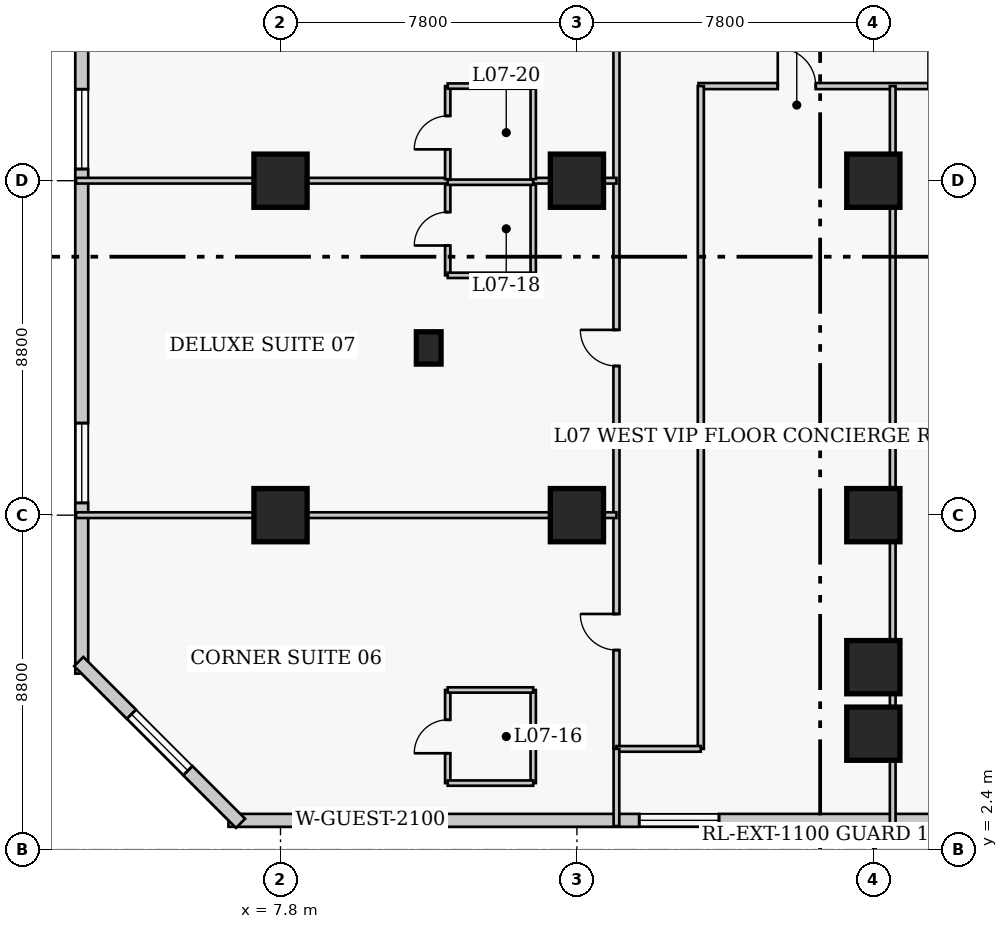
"""IFC4 building model, lengths in metres.
Left out: names, types, materials, properties, quantities, classifications, styles, units other than length and angle.
Written with IfcOpenShell. Run it as: python <this file> out.ifc"""

import sys

from ifc_helpers import new_model, si_unit, direction, frame, frame_2d, origin, origin_2d, place, context, subcontext, project, spatial, rectangle, extrude, element, fill, save


model = new_model("IFC4")
c1 = context("Model", 3, precision=1e-05, world=origin(), true_north=direction((0.0, 1.0)))
c2 = subcontext(c1, "Body", "Model", "MODEL_VIEW")
j1 = project(units=[si_unit("LENGTHUNIT", "METRE"), si_unit("PLANEANGLEUNIT", "RADIAN")], contexts=[c1])
p1 = place(None, origin())
s1 = spatial("IfcSite", under=j1, at=p1, CompositionType="ELEMENT")
p2 = place(p1, origin())
s2 = spatial("IfcBuilding", under=s1, at=p2, CompositionType="ELEMENT")
p3 = place(p2, frame((0.0, 0.0, 33.6)))
s3 = spatial("IfcBuildingStorey", under=s2, at=p3, CompositionType="ELEMENT", Elevation=33.6)
for number, where, z_axis, x_axis in (
    (1, (7.8, 11.2, 0.0), (0.0, 0.0, 1.0), (1.0, 0.0, 0.0)),
    (2, (7.8, 20.0, 0.0), (0.0, 0.0, 1.0), (1.0, 0.0, 0.0)),
    (3, (15.6, 11.2, 0.0), (0.0, 0.0, 1.0), (1.0, 0.0, 0.0)),
    (4, (15.6, 20.0, 0.0), (0.0, 0.0, 1.0), (1.0, 0.0, 0.0)),
    (5, (23.4, 11.2, 0.0), (0.0, 0.0, 1.0), (1.0, 0.0, 0.0)),
    (6, (23.4, 20.0, 0.0), (0.0, 0.0, 1.0), (1.0, 0.0, 0.0)),
    (7, (23.4, 7.2, 0.0), (0.0, 0.0, 1.0), (1.0, 0.0, 0.0)),
    (8, (23.4, 5.45, 0.0), (0.0, 0.0, 1.0), (1.0, 0.0, 0.0)),
):
    element("IfcColumn", number, at=place(p3, frame(where, z_axis=z_axis, x_axis=x_axis)), inside=s3, PredefinedType="COLUMN", context=c2, shape_type="SweptSolid", body=[
        extrude(rectangle(XDim=1.4, YDim=1.4, at=origin_2d()), origin(), (0.0, 0.0, 1.0), 3.8),
    ])
p4 = place(p3, frame((11.7, 15.6, 0.0), z_axis=(0.0, 0.0, 1.0), x_axis=(1.0, 0.0, 0.0)))
e9 = element("IfcColumn", 9, at=p4, inside=s3, PredefinedType="PILASTER", context=c2, shape_type="SweptSolid", body=[
    extrude(rectangle(XDim=0.65, YDim=0.85, at=origin_2d()), origin(), (0.0, 0.0, 1.0), 3.8),
])
p5 = place(p3, frame((6.43, 3.17, 0.0), z_axis=(0.0, 0.0, 1.0), x_axis=(1.0, 0.0, 0.0)))
e10 = element("IfcWall", 10, at=p5, inside=s3, PredefinedType="SOLIDWALL", context=c2, shape_type="SweptSolid", body=[
    extrude(rectangle(XDim=29.89, YDim=0.34, at=frame_2d((14.945, 0.0))), origin(), (0.0, 0.0, 1.0), 3.54),
])
p6 = place(p5, frame((20.17, 0.0, 0.0)))
e11 = element("IfcOpeningElement", 11, at=p6, cuts=e10, PredefinedType="OPENING", context=c2, shape_type="SweptSolid", body=[
    extrude(rectangle(XDim=1.4, YDim=2.15, at=frame_2d((0.7, 1.075))), frame((0.0, 0.18, 0.0), z_axis=(0.0, -1.0, 0.0), x_axis=(1.0, 0.0, 0.0)), (0.0, 0.0, 1.0), 0.36),
])
p7 = place(p5, frame((2.686, 0.0, 0.85)))
e12 = element("IfcOpeningElement", 12, at=p7, cuts=e10, PredefinedType="OPENING", context=c2, shape_type="SweptSolid", body=[
    extrude(rectangle(XDim=2.1, YDim=1.85, at=frame_2d((1.05, 0.925))), frame((0.0, 0.18, 0.0), z_axis=(0.0, -1.0, 0.0), x_axis=(1.0, 0.0, 0.0)), (0.0, 0.0, 1.0), 0.36),
])
p8 = place(p5, frame((10.809, 0.0, 0.85)))
e13 = element("IfcOpeningElement", 13, at=p8, cuts=e10, PredefinedType="OPENING", context=c2, shape_type="SweptSolid", body=[
    extrude(rectangle(XDim=2.1, YDim=1.85, at=frame_2d((1.05, 0.925))), frame((0.0, 0.18, 0.0), z_axis=(0.0, -1.0, 0.0), x_axis=(1.0, 0.0, 0.0)), (0.0, 0.0, 1.0), 0.36),
])
p9 = place(p5, frame((25.104, 0.0, 0.85)))
e14 = element("IfcOpeningElement", 14, at=p9, cuts=e10, PredefinedType="OPENING", context=c2, shape_type="SweptSolid", body=[
    extrude(rectangle(XDim=2.1, YDim=1.85, at=frame_2d((1.05, 0.925))), frame((0.0, 0.18, 0.0), z_axis=(0.0, -1.0, 0.0), x_axis=(1.0, 0.0, 0.0)), (0.0, 0.0, 1.0), 0.36),
])
p10 = place(p3, frame((2.57, 42.17, 0.0), z_axis=(0.0, 0.0, 1.0), x_axis=(0.0, -1.0, 0.0)))
e15 = element("IfcWall", 15, at=p10, inside=s3, PredefinedType="SOLIDWALL", context=c2, shape_type="SweptSolid", body=[
    extrude(rectangle(XDim=35.14, YDim=0.34, at=frame_2d((17.57, 0.0))), origin(), (0.0, 0.0, 1.0), 3.54),
])
p11 = place(p10, frame((3.343, 0.0, 0.85)))
e16 = element("IfcOpeningElement", 16, at=p11, cuts=e15, PredefinedType="OPENING", context=c2, shape_type="SweptSolid", body=[
    extrude(rectangle(XDim=2.1, YDim=1.85, at=frame_2d((1.05, 0.925))), frame((0.0, 0.18, 0.0), z_axis=(0.0, -1.0, 0.0), x_axis=(1.0, 0.0, 0.0)), (0.0, 0.0, 1.0), 0.36),
])
p12 = place(p10, frame((10.978, 0.0, 0.85)))
e17 = element("IfcOpeningElement", 17, at=p12, cuts=e15, PredefinedType="OPENING", context=c2, shape_type="SweptSolid", body=[
    extrude(rectangle(XDim=2.1, YDim=1.85, at=frame_2d((1.05, 0.925))), frame((0.0, 0.18, 0.0), z_axis=(0.0, -1.0, 0.0), x_axis=(1.0, 0.0, 0.0)), (0.0, 0.0, 1.0), 0.36),
])
p13 = place(p10, frame((19.762, 0.0, 0.85)))
e18 = element("IfcOpeningElement", 18, at=p13, cuts=e15, PredefinedType="OPENING", context=c2, shape_type="SweptSolid", body=[
    extrude(rectangle(XDim=2.1, YDim=1.85, at=frame_2d((1.05, 0.925))), frame((0.0, 0.18, 0.0), z_axis=(0.0, -1.0, 0.0), x_axis=(1.0, 0.0, 0.0)), (0.0, 0.0, 1.0), 0.36),
])
p14 = place(p10, frame((28.548, 0.0, 0.85)))
e19 = element("IfcOpeningElement", 19, at=p14, cuts=e15, PredefinedType="OPENING", context=c2, shape_type="SweptSolid", body=[
    extrude(rectangle(XDim=2.1, YDim=1.85, at=frame_2d((1.05, 0.925))), frame((0.0, 0.18, 0.0), z_axis=(0.0, -1.0, 0.0), x_axis=(1.0, 0.0, 0.0)), (0.0, 0.0, 1.0), 0.36),
])
p15 = place(p3, frame((2.492, 7.348, 0.0), z_axis=(0.0, 0.0, 1.0), x_axis=(0.707106781187, -0.707106781187, 0.0)))
e20 = element("IfcWall", 20, at=p15, inside=s3, PredefinedType="SOLIDWALL", context=c2, shape_type="SweptSolid", body=[
    extrude(rectangle(XDim=6.02, YDim=0.34, at=frame_2d((3.01, 0.0))), origin(), (0.0, 0.0, 1.0), 3.54),
])
p16 = place(p15, frame((1.96, 0.0, 0.85)))
e21 = element("IfcOpeningElement", 21, at=p16, cuts=e20, PredefinedType="OPENING", context=c2, shape_type="SweptSolid", body=[
    extrude(rectangle(XDim=2.1, YDim=1.85, at=frame_2d((1.05, 0.925))), frame((0.0, 0.18, 0.0), z_axis=(0.0, -1.0, 0.0), x_axis=(1.0, 0.0, 0.0)), (0.0, 0.0, 1.0), 0.36),
])
p17 = place(p3, frame((18.8, 22.49, 0.0), z_axis=(0.0, 0.0, 1.0), x_axis=(1.0, 0.0, 0.0)))
e22 = element("IfcWall", 22, at=p17, inside=s3, PredefinedType="PARTITIONING", context=c2, shape_type="SweptSolid", body=[
    extrude(rectangle(XDim=17.0, YDim=0.16, at=frame_2d((8.5, 0.0))), origin(), (0.0, 0.0, 1.0), 3.54),
])
p18 = place(p17, frame((2.085, 0.0, 0.0)))
e23 = element("IfcOpeningElement", 23, at=p18, cuts=e22, PredefinedType="OPENING", context=c2, shape_type="SweptSolid", body=[
    extrude(rectangle(XDim=1.0, YDim=2.15, at=frame_2d((0.5, 1.075))), frame((0.0, 0.09, 0.0), z_axis=(0.0, -1.0, 0.0), x_axis=(1.0, 0.0, 0.0)), (0.0, 0.0, 1.0), 0.18),
])
p19 = place(p17, frame((6.052, 0.0, 0.0)))
e24 = element("IfcOpeningElement", 24, at=p19, cuts=e22, PredefinedType="OPENING", context=c2, shape_type="SweptSolid", body=[
    extrude(rectangle(XDim=0.95, YDim=2.1, at=frame_2d((0.475, 1.05))), frame((0.0, 0.09, 0.0), z_axis=(0.0, -1.0, 0.0), x_axis=(1.0, 0.0, 0.0)), (0.0, 0.0, 1.0), 0.18),
])
p20 = place(p17, frame((11.997, 0.0, 0.0)))
e25 = element("IfcOpeningElement", 25, at=p20, cuts=e22, PredefinedType="OPENING", context=c2, shape_type="SweptSolid", body=[
    extrude(rectangle(XDim=0.95, YDim=2.1, at=frame_2d((0.475, 1.05))), frame((0.0, 0.09, 0.0), z_axis=(0.0, -1.0, 0.0), x_axis=(1.0, 0.0, 0.0)), (0.0, 0.0, 1.0), 0.18),
])
p21 = place(p3, frame((16.64, 5.05, 0.0), z_axis=(0.0, 0.0, 1.0), x_axis=(0.0, 1.0, 0.0)))
e26 = element("IfcWall", 26, at=p21, inside=s3, PredefinedType="PARTITIONING", context=c2, shape_type="SweptSolid", body=[
    extrude(rectangle(XDim=35.6, YDim=0.16, at=frame_2d((17.8, 0.0))), origin(), (0.0, 0.0, 1.0), 3.54),
])
p22 = place(p21, frame((2.6, 0.0, 0.0)))
e27 = element("IfcOpeningElement", 27, at=p22, cuts=e26, PredefinedType="OPENING", context=c2, shape_type="SweptSolid", body=[
    extrude(rectangle(XDim=0.95, YDim=2.1, at=frame_2d((0.475, 1.05))), frame((0.0, 0.09, 0.0), z_axis=(0.0, -1.0, 0.0), x_axis=(1.0, 0.0, 0.0)), (0.0, 0.0, 1.0), 0.18),
])
p23 = place(p21, frame((10.075, 0.0, 0.0)))
e28 = element("IfcOpeningElement", 28, at=p23, cuts=e26, PredefinedType="OPENING", context=c2, shape_type="SweptSolid", body=[
    extrude(rectangle(XDim=0.95, YDim=2.1, at=frame_2d((0.475, 1.05))), frame((0.0, 0.09, 0.0), z_axis=(0.0, -1.0, 0.0), x_axis=(1.0, 0.0, 0.0)), (0.0, 0.0, 1.0), 0.18),
])
p24 = place(p21, frame((18.875, 0.0, 0.0)))
e29 = element("IfcOpeningElement", 29, at=p24, cuts=e26, PredefinedType="OPENING", context=c2, shape_type="SweptSolid", body=[
    extrude(rectangle(XDim=0.95, YDim=2.1, at=frame_2d((0.475, 1.05))), frame((0.0, 0.09, 0.0), z_axis=(0.0, -1.0, 0.0), x_axis=(1.0, 0.0, 0.0)), (0.0, 0.0, 1.0), 0.18),
])
p25 = place(p21, frame((26.575, 0.0, 0.0)))
e30 = element("IfcOpeningElement", 30, at=p25, cuts=e26, PredefinedType="OPENING", context=c2, shape_type="SweptSolid", body=[
    extrude(rectangle(XDim=0.95, YDim=2.1, at=frame_2d((0.475, 1.05))), frame((0.0, 0.09, 0.0), z_axis=(0.0, -1.0, 0.0), x_axis=(1.0, 0.0, 0.0)), (0.0, 0.0, 1.0), 0.18),
])
p26 = place(p21, frame((30.9, 0.0, 0.0)))
e31 = element("IfcOpeningElement", 31, at=p26, cuts=e26, PredefinedType="OPENING", context=c2, shape_type="SweptSolid", body=[
    extrude(rectangle(XDim=1.0, YDim=2.15, at=frame_2d((0.5, 1.075))), frame((0.0, 0.09, 0.0), z_axis=(0.0, -1.0, 0.0), x_axis=(1.0, 0.0, 0.0)), (0.0, 0.0, 1.0), 0.18),
])
p27 = place(p3, frame((18.86, 5.05, 0.0), z_axis=(0.0, 0.0, 1.0), x_axis=(0.0, 1.0, 0.0)))
e32 = element("IfcWall", 32, at=p27, inside=s3, PredefinedType="PARTITIONING", context=c2, shape_type="SweptSolid", body=[
    extrude(rectangle(XDim=17.44, YDim=0.16, at=frame_2d((8.72, 0.0))), origin(), (0.0, 0.0, 1.0), 3.54),
])
p28 = place(p3, frame((16.64, 5.05, 0.0), z_axis=(0.0, 0.0, 1.0), x_axis=(1.0, 0.0, 0.0)))
e33 = element("IfcWall", 33, at=p28, inside=s3, PredefinedType="PARTITIONING", context=c2, shape_type="SweptSolid", body=[
    extrude(rectangle(XDim=2.22, YDim=0.15, at=frame_2d((1.11, 0.0))), origin(), (0.0, 0.0, 1.0), 3.54),
])
p29 = place(p3, frame((23.91, 3.02, 0.0), z_axis=(0.0, 0.0, 1.0), x_axis=(0.0, 1.0, 0.0)))
e34 = element("IfcWall", 34, at=p29, inside=s3, PredefinedType="PARTITIONING", context=c2, shape_type="SweptSolid", body=[
    extrude(rectangle(XDim=19.47, YDim=0.15, at=frame_2d((9.735, 0.0))), origin(), (0.0, 0.0, 1.0), 3.54),
])
p30 = place(p3, frame((16.64, 3.02, 0.0), z_axis=(0.0, 0.0, 1.0), x_axis=(0.0, 1.0, 0.0)))
e35 = element("IfcWall", 35, at=p30, inside=s3, PredefinedType="PARTITIONING", context=c2, shape_type="SweptSolid", body=[
    extrude(rectangle(XDim=2.03, YDim=0.15, at=frame_2d((1.015, 0.0))), origin(), (0.0, 0.0, 1.0), 3.54),
])
p31 = place(p3, frame((12.2, 4.15, 0.0), z_axis=(0.0, 0.0, 1.0), x_axis=(0.0, 1.0, 0.0)))
e36 = element("IfcWall", 36, at=p31, inside=s3, PredefinedType="PLUMBINGWALL", context=c2, shape_type="SweptSolid", body=[
    extrude(rectangle(XDim=2.45, YDim=0.14, at=frame_2d((1.225, 0.0))), origin(), (0.0, 0.0, 1.0), 3.54),
])
p32 = place(p31, frame((0.785, 0.0, 0.0)))
e37 = element("IfcOpeningElement", 37, at=p32, cuts=e36, PredefinedType="OPENING", context=c2, shape_type="SweptSolid", body=[
    extrude(rectangle(XDim=0.88, YDim=2.05, at=frame_2d((0.44, 1.025))), frame((0.0, 0.08, 0.0), z_axis=(0.0, -1.0, 0.0), x_axis=(1.0, 0.0, 0.0)), (0.0, 0.0, 1.0), 0.16),
])
p33 = place(p3, frame((14.45, 4.15, 0.0), z_axis=(0.0, 0.0, 1.0), x_axis=(0.0, 1.0, 0.0)))
e38 = element("IfcWall", 38, at=p33, inside=s3, PredefinedType="PLUMBINGWALL", context=c2, shape_type="SweptSolid", body=[
    extrude(rectangle(XDim=2.45, YDim=0.14, at=frame_2d((1.225, 0.0))), origin(), (0.0, 0.0, 1.0), 3.54),
])
for number, where, z_axis, x_axis in (
    (39, (12.2, 4.15, 0.0), (0.0, 0.0, 1.0), (1.0, 0.0, 0.0)),
    (40, (12.2, 6.6, 0.0), (0.0, 0.0, 1.0), (1.0, 0.0, 0.0)),
):
    element("IfcWall", number, at=place(p3, frame(where, z_axis=z_axis, x_axis=x_axis)), inside=s3, PredefinedType="PLUMBINGWALL", context=c2, shape_type="SweptSolid", body=[
        extrude(rectangle(XDim=2.25, YDim=0.14, at=frame_2d((1.125, 0.0))), origin(), (0.0, 0.0, 1.0), 3.54),
    ])
p34 = place(p3, frame((2.42, 11.2, 0.0), z_axis=(0.0, 0.0, 1.0), x_axis=(1.0, 0.0, 0.0)))
e41 = element("IfcWall", 41, at=p34, inside=s3, PredefinedType="PARTITIONING", context=c2, shape_type="SweptSolid", body=[
    extrude(rectangle(XDim=14.22, YDim=0.15, at=frame_2d((7.11, 0.0))), origin(), (0.0, 0.0, 1.0), 2.593),
])
p35 = place(p3, frame((12.2, 17.51, 0.0), z_axis=(0.0, 0.0, 1.0), x_axis=(0.0, 1.0, 0.0)))
e42 = element("IfcWall", 42, at=p35, inside=s3, PredefinedType="PLUMBINGWALL", context=c2, shape_type="SweptSolid", body=[
    extrude(rectangle(XDim=2.45, YDim=0.14, at=frame_2d((1.225, 0.0))), origin(), (0.0, 0.0, 1.0), 3.54),
])
p36 = place(p35, frame((0.785, 0.0, 0.0)))
e43 = element("IfcOpeningElement", 43, at=p36, cuts=e42, PredefinedType="OPENING", context=c2, shape_type="SweptSolid", body=[
    extrude(rectangle(XDim=0.88, YDim=2.05, at=frame_2d((0.44, 1.025))), frame((0.0, 0.08, 0.0), z_axis=(0.0, -1.0, 0.0), x_axis=(1.0, 0.0, 0.0)), (0.0, 0.0, 1.0), 0.16),
])
p37 = place(p3, frame((14.45, 17.51, 0.0), z_axis=(0.0, 0.0, 1.0), x_axis=(0.0, 1.0, 0.0)))
e44 = element("IfcWall", 44, at=p37, inside=s3, PredefinedType="PLUMBINGWALL", context=c2, shape_type="SweptSolid", body=[
    extrude(rectangle(XDim=2.45, YDim=0.14, at=frame_2d((1.225, 0.0))), origin(), (0.0, 0.0, 1.0), 3.54),
])
p38 = place(p3, frame((12.2, 17.51, 0.0), z_axis=(0.0, 0.0, 1.0), x_axis=(1.0, 0.0, 0.0)))
e45 = element("IfcWall", 45, at=p38, inside=s3, PredefinedType="PLUMBINGWALL", context=c2, shape_type="SweptSolid", body=[
    extrude(rectangle(XDim=2.25, YDim=0.14, at=frame_2d((1.125, 0.0))), origin(), (0.0, 0.0, 1.0), 3.54),
])
p39 = place(p3, frame((12.2, 19.96, 0.0), z_axis=(0.0, 0.0, 1.0), x_axis=(1.0, 0.0, 0.0)))
e46 = element("IfcWall", 46, at=p39, inside=s3, PredefinedType="PLUMBINGWALL", context=c2, shape_type="SweptSolid", body=[
    extrude(rectangle(XDim=2.25, YDim=0.14, at=frame_2d((1.125, 0.0))), origin(), (0.0, 0.0, 1.0), 2.593),
])
p40 = place(p3, frame((2.42, 20.0, 0.0), z_axis=(0.0, 0.0, 1.0), x_axis=(1.0, 0.0, 0.0)))
e47 = element("IfcWall", 47, at=p40, inside=s3, PredefinedType="PARTITIONING", context=c2, shape_type="SweptSolid", body=[
    extrude(rectangle(XDim=9.78, YDim=0.15, at=frame_2d((4.89, 0.0))), origin(), (0.0, 0.0, 1.0), 2.593),
])
p41 = place(p3, frame((14.45, 20.0, 0.0), z_axis=(0.0, 0.0, 1.0), x_axis=(1.0, 0.0, 0.0)))
e48 = element("IfcWall", 48, at=p41, inside=s3, PredefinedType="PARTITIONING", context=c2, shape_type="SweptSolid", body=[
    extrude(rectangle(XDim=2.19, YDim=0.15, at=frame_2d((1.095, 0.0))), origin(), (0.0, 0.0, 1.0), 2.593),
])
p42 = place(p3, frame((12.2, 20.04, 0.0), z_axis=(0.0, 0.0, 1.0), x_axis=(0.0, 1.0, 0.0)))
e49 = element("IfcWall", 49, at=p42, inside=s3, PredefinedType="PLUMBINGWALL", context=c2, shape_type="SweptSolid", body=[
    extrude(rectangle(XDim=2.45, YDim=0.14, at=frame_2d((1.225, 0.0))), origin(), (0.0, 0.0, 1.0), 3.54),
])
p43 = place(p42, frame((0.785, 0.0, 0.0)))
e50 = element("IfcOpeningElement", 50, at=p43, cuts=e49, PredefinedType="OPENING", context=c2, shape_type="SweptSolid", body=[
    extrude(rectangle(XDim=0.88, YDim=2.05, at=frame_2d((0.44, 1.025))), frame((0.0, 0.08, 0.0), z_axis=(0.0, -1.0, 0.0), x_axis=(1.0, 0.0, 0.0)), (0.0, 0.0, 1.0), 0.16),
])
p44 = place(p3, frame((14.45, 20.04, 0.0), z_axis=(0.0, 0.0, 1.0), x_axis=(0.0, 1.0, 0.0)))
e51 = element("IfcWall", 51, at=p44, inside=s3, PredefinedType="PLUMBINGWALL", context=c2, shape_type="SweptSolid", body=[
    extrude(rectangle(XDim=2.45, YDim=0.14, at=frame_2d((1.225, 0.0))), origin(), (0.0, 0.0, 1.0), 3.54),
])
p45 = place(p3, frame((12.2, 22.49, 0.0), z_axis=(0.0, 0.0, 1.0), x_axis=(1.0, 0.0, 0.0)))
e52 = element("IfcWall", 52, at=p45, inside=s3, PredefinedType="PLUMBINGWALL", context=c2, shape_type="SweptSolid", body=[
    extrude(rectangle(XDim=2.25, YDim=0.14, at=frame_2d((1.125, 0.0))), origin(), (0.0, 0.0, 1.0), 3.54),
])
p46 = place(p7, origin())
e53 = element("IfcWindow", 53, at=p46, inside=s3, PartitioningType="SINGLE_PANEL", PredefinedType="WINDOW", context=c2, shape_type="SweptSolid", body=[
    extrude(rectangle(XDim=2.1, YDim=1.85, at=frame_2d((1.05, 0.925))), frame((0.0, 0.03, 0.0), z_axis=(0.0, -1.0, 0.0), x_axis=(1.0, 0.0, 0.0)), (0.0, 0.0, 1.0), 0.06),
])
fill(e12, e53)
p47 = place(p8, origin())
e54 = element("IfcWindow", 54, at=p47, inside=s3, PartitioningType="SINGLE_PANEL", PredefinedType="WINDOW", context=c2, shape_type="SweptSolid", body=[
    extrude(rectangle(XDim=2.1, YDim=1.85, at=frame_2d((1.05, 0.925))), frame((0.0, 0.03, 0.0), z_axis=(0.0, -1.0, 0.0), x_axis=(1.0, 0.0, 0.0)), (0.0, 0.0, 1.0), 0.06),
])
fill(e13, e54)
p48 = place(p13, origin())
e55 = element("IfcWindow", 55, at=p48, inside=s3, PartitioningType="SINGLE_PANEL", PredefinedType="WINDOW", context=c2, shape_type="SweptSolid", body=[
    extrude(rectangle(XDim=2.1, YDim=1.85, at=frame_2d((1.05, 0.925))), frame((0.0, 0.03, 0.0), z_axis=(0.0, -1.0, 0.0), x_axis=(1.0, 0.0, 0.0)), (0.0, 0.0, 1.0), 0.06),
])
fill(e18, e55)
p49 = place(p14, origin())
e56 = element("IfcWindow", 56, at=p49, inside=s3, PartitioningType="SINGLE_PANEL", PredefinedType="WINDOW", context=c2, shape_type="SweptSolid", body=[
    extrude(rectangle(XDim=2.1, YDim=1.85, at=frame_2d((1.05, 0.925))), frame((0.0, 0.03, 0.0), z_axis=(0.0, -1.0, 0.0), x_axis=(1.0, 0.0, 0.0)), (0.0, 0.0, 1.0), 0.06),
])
fill(e19, e56)
p50 = place(p16, origin())
e57 = element("IfcWindow", 57, at=p50, inside=s3, PartitioningType="SINGLE_PANEL", PredefinedType="WINDOW", context=c2, shape_type="SweptSolid", body=[
    extrude(rectangle(XDim=2.1, YDim=1.85, at=frame_2d((1.05, 0.925))), frame((0.0, 0.03, 0.0), z_axis=(0.0, -1.0, 0.0), x_axis=(1.0, 0.0, 0.0)), (0.0, 0.0, 1.0), 0.06),
])
fill(e21, e57)
p51 = place(p18, origin())
e58 = element("IfcDoor", 58, at=p51, inside=s3, OperationType="SINGLE_SWING_LEFT", PredefinedType="DOOR", context=c2, shape_type="SweptSolid", body=[
    extrude(rectangle(XDim=1.0, YDim=2.15, at=frame_2d((0.5, 1.075))), frame((0.0, 0.025, 0.0), z_axis=(0.0, -1.0, 0.0), x_axis=(1.0, 0.0, 0.0)), (0.0, 0.0, 1.0), 0.05),
])
fill(e23, e58)
p52 = place(p32, origin())
e59 = element("IfcDoor", 59, at=p52, inside=s3, OperationType="SINGLE_SWING_LEFT", PredefinedType="DOOR", context=c2, shape_type="SweptSolid", body=[
    extrude(rectangle(XDim=0.88, YDim=2.05, at=frame_2d((0.44, 1.025))), frame((0.0, 0.025, 0.0), z_axis=(0.0, -1.0, 0.0), x_axis=(1.0, 0.0, 0.0)), (0.0, 0.0, 1.0), 0.05),
])
fill(e37, e59)
p53 = place(p22, origin())
e60 = element("IfcDoor", 60, at=p53, inside=s3, OperationType="SINGLE_SWING_RIGHT", PredefinedType="DOOR", context=c2, shape_type="SweptSolid", body=[
    extrude(rectangle(XDim=0.95, YDim=2.1, at=frame_2d((0.475, 1.05))), frame((0.0, 0.025, 0.0), z_axis=(0.0, -1.0, 0.0), x_axis=(1.0, 0.0, 0.0)), (0.0, 0.0, 1.0), 0.05),
])
fill(e27, e60)
p54 = place(p36, origin())
e61 = element("IfcDoor", 61, at=p54, inside=s3, OperationType="SINGLE_SWING_LEFT", PredefinedType="DOOR", context=c2, shape_type="SweptSolid", body=[
    extrude(rectangle(XDim=0.88, YDim=2.05, at=frame_2d((0.44, 1.025))), frame((0.0, 0.025, 0.0), z_axis=(0.0, -1.0, 0.0), x_axis=(1.0, 0.0, 0.0)), (0.0, 0.0, 1.0), 0.05),
])
fill(e43, e61)
p55 = place(p23, origin())
e62 = element("IfcDoor", 62, at=p55, inside=s3, OperationType="SINGLE_SWING_RIGHT", PredefinedType="DOOR", context=c2, shape_type="SweptSolid", body=[
    extrude(rectangle(XDim=0.95, YDim=2.1, at=frame_2d((0.475, 1.05))), frame((0.0, 0.025, 0.0), z_axis=(0.0, -1.0, 0.0), x_axis=(1.0, 0.0, 0.0)), (0.0, 0.0, 1.0), 0.05),
])
fill(e28, e62)
p56 = place(p43, origin())
e63 = element("IfcDoor", 63, at=p56, inside=s3, OperationType="SINGLE_SWING_LEFT", PredefinedType="DOOR", context=c2, shape_type="SweptSolid", body=[
    extrude(rectangle(XDim=0.88, YDim=2.05, at=frame_2d((0.44, 1.025))), frame((0.0, 0.025, 0.0), z_axis=(0.0, -1.0, 0.0), x_axis=(1.0, 0.0, 0.0)), (0.0, 0.0, 1.0), 0.05),
])
fill(e50, e63)
save(model, sys.argv[1])
